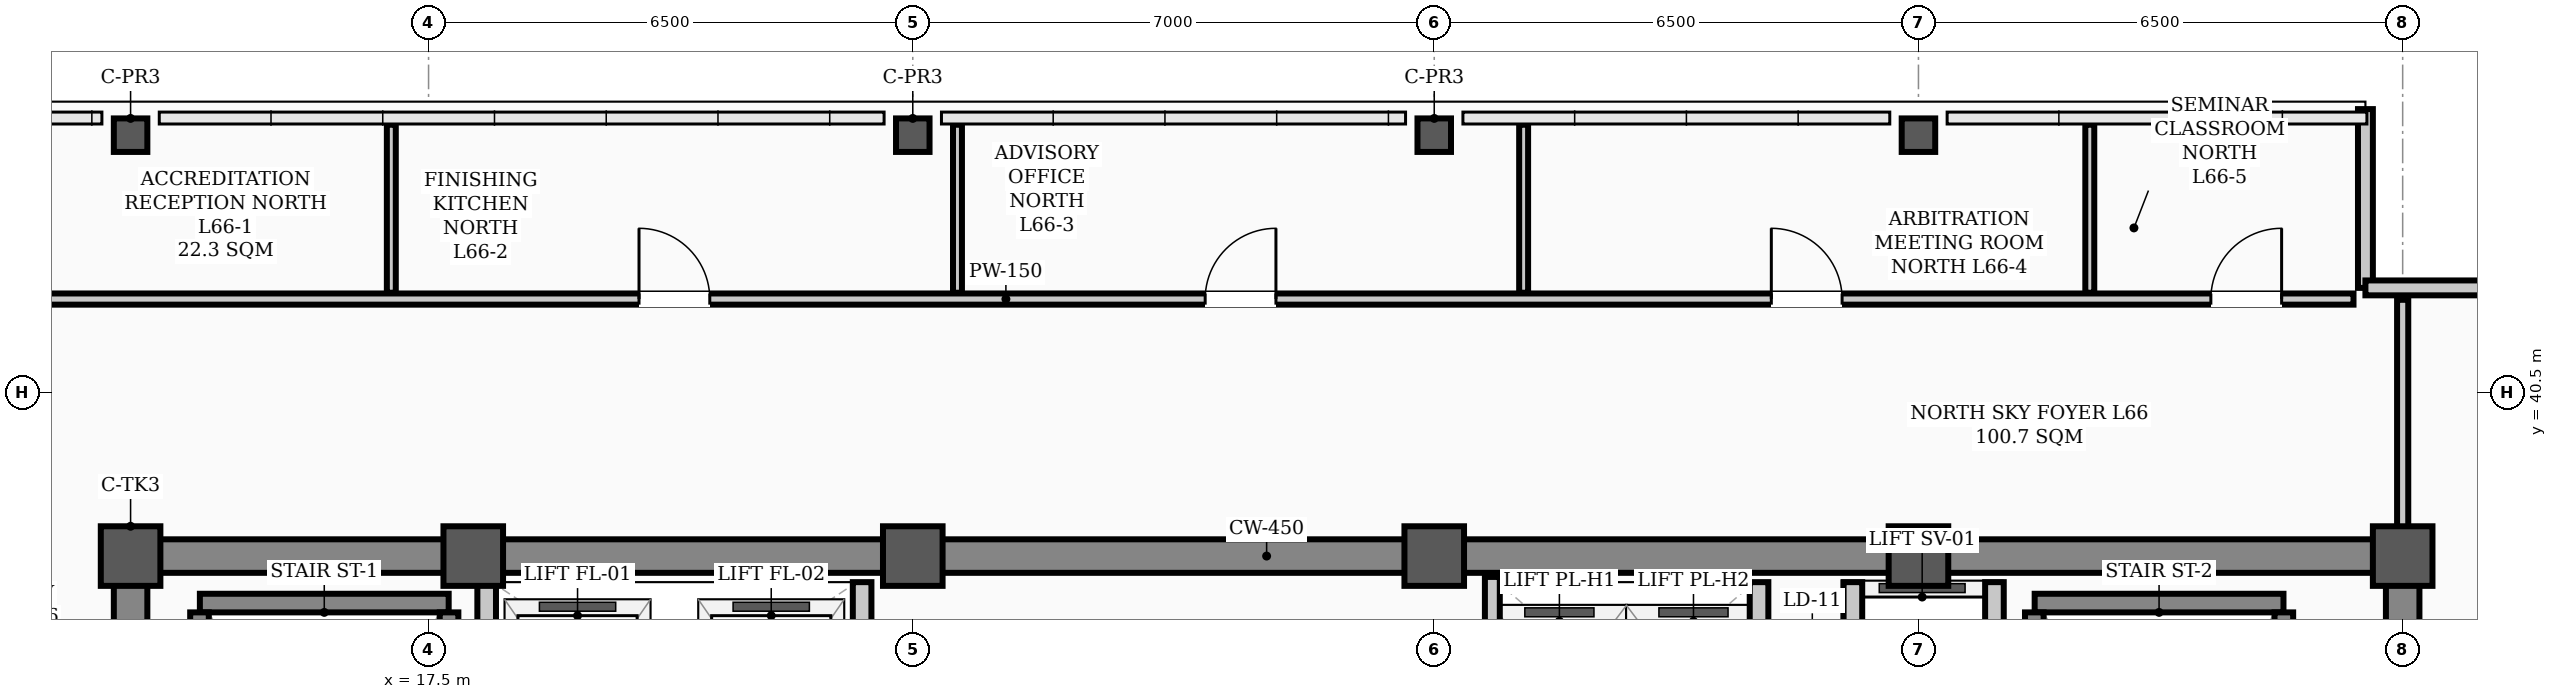
"""IFC4 building model, lengths in metres.
Left out: names, types, materials, properties, quantities, classifications, styles, units other than length and angle.
Written with IfcOpenShell. Run it as: python <this file> out.ifc"""

import sys

from ifc_helpers import new_model, si_unit, direction, frame, frame_2d, origin, origin_2d, place, context, subcontext, project, spatial, rectangle, hollow_rectangle, extrude, element, fill, save


model = new_model("IFC4")
c1 = context("Model", 3, precision=1e-05, world=origin(), true_north=direction((0.0, 1.0)))
c2 = subcontext(c1, "Body", "Model", "MODEL_VIEW")
j1 = project(units=[si_unit("LENGTHUNIT", "METRE"), si_unit("PLANEANGLEUNIT", "RADIAN")], contexts=[c1])
p1 = place(None, origin())
s1 = spatial("IfcSite", under=j1, at=p1, CompositionType="ELEMENT")
p2 = place(p1, origin())
s2 = spatial("IfcBuilding", under=s1, at=p2, CompositionType="ELEMENT")
p3 = place(p2, frame((0.0, 0.0, 265.7)))
s3 = spatial("IfcBuildingStorey", under=s2, at=p3, CompositionType="ELEMENT", Elevation=265.7)
for number, where, z_axis, x_axis in (
    (1, (13.5, 38.3, 0.0), (0.0, 0.0, 1.0), (1.0, 0.0, 0.0)),
    (2, (18.1, 38.3, 0.0), (0.0, 0.0, 1.0), (1.0, 0.0, 0.0)),
    (3, (24.0, 38.3, 0.0), (0.0, 0.0, 1.0), (1.0, 0.0, 0.0)),
    (4, (31.0, 38.3, 0.0), (0.0, 0.0, 1.0), (1.0, 0.0, 0.0)),
    (5, (37.5, 38.3, 0.0), (0.0, 0.0, 1.0), (1.0, 0.0, 0.0)),
    (6, (44.0, 38.3, 0.0), (0.0, 0.0, 1.0), (1.0, 0.0, 0.0)),
):
    element("IfcColumn", number, at=place(p3, frame(where, z_axis=z_axis, x_axis=x_axis)), inside=s3, PredefinedType="COLUMN", context=c2, shape_type="SweptSolid", body=[
        extrude(hollow_rectangle(XDim=0.8, YDim=0.8, WallThickness=0.032, InnerFilletRadius=0.016, OuterFilletRadius=0.048, at=origin_2d()), origin(), (0.0, 0.0, 1.0), 3.9),
    ])
for number, where, z_axis, x_axis in (
    (7, (13.5, 43.95, 0.0), (0.0, 0.0, 1.0), (1.0, 0.0, 0.0)),
    (8, (24.0, 43.95, 0.0), (0.0, 0.0, 1.0), (1.0, 0.0, 0.0)),
    (9, (31.0, 43.95, 0.0), (0.0, 0.0, 1.0), (1.0, 0.0, 0.0)),
    (10, (37.5, 43.95, 0.0), (0.0, 0.0, 1.0), (1.0, 0.0, 0.0)),
):
    element("IfcColumn", number, at=place(p3, frame(where, z_axis=z_axis, x_axis=x_axis)), inside=s3, PredefinedType="COLUMN", context=c2, shape_type="SweptSolid", body=[
        extrude(hollow_rectangle(XDim=0.45, YDim=0.45, WallThickness=0.022, InnerFilletRadius=0.022, OuterFilletRadius=0.044, at=origin_2d()), origin(), (0.0, 0.0, 1.0), 3.9),
    ])
p4 = place(p3, frame((43.5, 44.3, 0.0), z_axis=(0.0, 0.0, 1.0), x_axis=(0.0, -1.0, 0.0)))
e11 = element("IfcWall", 11, at=p4, inside=s3, PredefinedType="PARAPET", context=c2, shape_type="SweptSolid", body=[
    extrude(rectangle(XDim=2.4, YDim=0.2, at=frame_2d((1.2, 0.0))), origin(), (0.0, 0.0, 1.0), 1.2),
])
p5 = place(p3, frame((43.5, 41.9, 0.0), z_axis=(0.0, 0.0, 1.0), x_axis=(1.0, 0.0, 0.0)))
e12 = element("IfcWall", 12, at=p5, inside=s3, PredefinedType="PARAPET", context=c2, shape_type="SweptSolid", body=[
    extrude(rectangle(XDim=2.4, YDim=0.2, at=frame_2d((1.2, 0.0))), origin(), (0.0, 0.0, 1.0), 1.2),
])
p6 = place(p3, frame((13.5, 38.3, 0.0), z_axis=(0.0, 0.0, 1.0), x_axis=(1.0, 0.0, 0.0)))
e13 = element("IfcWall", 13, at=p6, inside=s3, PredefinedType="SHEAR", context=c2, shape_type="SweptSolid", body=[
    extrude(rectangle(XDim=30.5, YDim=0.45, at=frame_2d((15.25, 0.0))), origin(), (0.0, 0.0, 1.0), 3.72),
])
for number, where, z_axis, x_axis in (
    (14, (13.5, 29.35, 0.0), (0.0, 0.0, 1.0), (0.0, 1.0, 0.0)),
    (15, (44.0, 29.35, 0.0), (0.0, 0.0, 1.0), (0.0, 1.0, 0.0)),
):
    element("IfcWall", number, at=place(p3, frame(where, z_axis=z_axis, x_axis=x_axis)), inside=s3, PredefinedType="SHEAR", context=c2, shape_type="SweptSolid", body=[
        extrude(rectangle(XDim=8.6, YDim=0.45, at=frame_2d((4.3, 0.0))), origin(), (0.0, 0.0, 1.0), 3.72),
    ])
p7 = place(p3, frame((14.43, 37.669, 0.0), z_axis=(0.0, 0.0, 1.0), x_axis=(1.0, 0.0, 0.0)))
e16 = element("IfcWall", 16, at=p7, inside=s3, PredefinedType="STANDARD", context=c2, shape_type="SweptSolid", body=[
    extrude(rectangle(XDim=3.34, YDim=0.25, at=frame_2d((1.67, 0.0))), origin(), (0.0, 0.0, 1.0), 3.72),
])
for number, where, z_axis, x_axis in (
    (17, (14.425, 30.36, 0.0), (0.0, 0.0, 1.0), (0.0, 1.0, 0.0)),
    (18, (17.775, 30.36, 0.0), (0.0, 0.0, 1.0), (0.0, 1.0, 0.0)),
):
    element("IfcWall", number, at=place(p3, frame(where, z_axis=z_axis, x_axis=x_axis)), inside=s3, PredefinedType="STANDARD", context=c2, shape_type="SweptSolid", body=[
        extrude(rectangle(XDim=7.184, YDim=0.25, at=frame_2d((3.592, 0.0))), origin(), (0.0, 0.0, 1.0), 3.72),
    ])
p8 = place(p3, frame((39.06, 37.669, 0.0), z_axis=(0.0, 0.0, 1.0), x_axis=(1.0, 0.0, 0.0)))
e19 = element("IfcWall", 19, at=p8, inside=s3, PredefinedType="STANDARD", context=c2, shape_type="SweptSolid", body=[
    extrude(rectangle(XDim=3.34, YDim=0.25, at=frame_2d((1.67, 0.0))), origin(), (0.0, 0.0, 1.0), 3.72),
])
for number, where, z_axis, x_axis in (
    (20, (39.055, 30.36, 0.0), (0.0, 0.0, 1.0), (0.0, 1.0, 0.0)),
    (21, (42.405, 30.36, 0.0), (0.0, 0.0, 1.0), (0.0, 1.0, 0.0)),
):
    element("IfcWall", number, at=place(p3, frame(where, z_axis=z_axis, x_axis=x_axis)), inside=s3, PredefinedType="STANDARD", context=c2, shape_type="SweptSolid", body=[
        extrude(rectangle(XDim=7.184, YDim=0.25, at=frame_2d((3.592, 0.0))), origin(), (0.0, 0.0, 1.0), 3.72),
    ])
p9 = place(p3, frame((36.62, 31.95, 0.0), z_axis=(0.0, 0.0, 1.0), x_axis=(0.0, 1.0, 0.0)))
e22 = element("IfcWall", 22, at=p9, inside=s3, PredefinedType="STANDARD", context=c2, shape_type="SweptSolid", body=[
    extrude(rectangle(XDim=6.0, YDim=0.25, at=frame_2d((3.0, 0.0))), origin(), (0.0, 0.0, 1.0), 3.4),
])
p10 = place(p9, frame((0.9, 0.0, 0.0)))
e23 = element("IfcOpeningElement", 23, at=p10, cuts=e22, PredefinedType="OPENING", context=c2, shape_type="SweptSolid", body=[
    extrude(rectangle(XDim=1.1, YDim=2.08, at=frame_2d((0.55, 1.04))), frame((0.0, 0.135, 0.0), z_axis=(0.0, -1.0, 0.0), x_axis=(1.0, 0.0, 0.0)), (0.0, 0.0, 1.0), 0.27),
])
p11 = place(p9, frame((4.0, 0.0, 0.0)))
e24 = element("IfcOpeningElement", 24, at=p11, cuts=e22, PredefinedType="OPENING", context=c2, shape_type="SweptSolid", body=[
    extrude(rectangle(XDim=1.1, YDim=2.08, at=frame_2d((0.55, 1.04))), frame((0.0, 0.135, 0.0), z_axis=(0.0, -1.0, 0.0), x_axis=(1.0, 0.0, 0.0)), (0.0, 0.0, 1.0), 0.27),
])
p12 = place(p3, frame((38.52, 31.95, 0.0), z_axis=(0.0, 0.0, 1.0), x_axis=(0.0, 1.0, 0.0)))
e25 = element("IfcWall", 25, at=p12, inside=s3, PredefinedType="STANDARD", context=c2, shape_type="SweptSolid", body=[
    extrude(rectangle(XDim=6.0, YDim=0.25, at=frame_2d((3.0, 0.0))), origin(), (0.0, 0.0, 1.0), 3.48),
])
for number, where, z_axis, x_axis in (
    (26, (18.28, 34.62, 0.0), (0.0, 0.0, 1.0), (0.0, 1.0, 0.0)),
    (27, (23.32, 34.62, 0.0), (0.0, 0.0, 1.0), (0.0, 1.0, 0.0)),
):
    element("IfcWall", number, at=place(p3, frame(where, z_axis=z_axis, x_axis=x_axis)), inside=s3, PredefinedType="STANDARD", context=c2, shape_type="SweptSolid", body=[
        extrude(rectangle(XDim=3.33, YDim=0.25, at=frame_2d((1.665, 0.0))), origin(), (0.0, 0.0, 1.0), 3.4),
    ])
p13 = place(p3, frame((35.36, 34.9, 0.0), z_axis=(0.0, 0.0, 1.0), x_axis=(0.0, 1.0, 0.0)))
e28 = element("IfcWall", 28, at=p13, inside=s3, PredefinedType="STANDARD", context=c2, shape_type="SweptSolid", body=[
    extrude(rectangle(XDim=3.05, YDim=0.25, at=frame_2d((1.525, 0.0))), origin(), (0.0, 0.0, 1.0), 3.4),
])
p14 = place(p3, frame((7.16, 41.75, 0.0), z_axis=(0.0, 0.0, 1.0), x_axis=(1.0, 0.0, 0.0)))
e29 = element("IfcWall", 29, at=p14, inside=s3, PredefinedType="PARTITIONING", context=c2, shape_type="SweptSolid", body=[
    extrude(rectangle(XDim=36.18, YDim=0.15, at=frame_2d((18.09, 0.0))), origin(), (0.0, 0.0, 1.0), 3.2),
])
p15 = place(p14, frame((3.855, 0.0, 0.0)))
e30 = element("IfcOpeningElement", 30, at=p15, cuts=e29, PredefinedType="OPENING", context=c2, shape_type="SweptSolid", body=[
    extrude(rectangle(XDim=0.95, YDim=2.08, at=frame_2d((0.475, 1.04))), frame((0.0, 0.085, 0.0), z_axis=(0.0, -1.0, 0.0), x_axis=(1.0, 0.0, 0.0)), (0.0, 0.0, 1.0), 0.17),
])
p16 = place(p14, frame((13.165, 0.0, 0.0)))
e31 = element("IfcOpeningElement", 31, at=p16, cuts=e29, PredefinedType="OPENING", context=c2, shape_type="SweptSolid", body=[
    extrude(rectangle(XDim=0.95, YDim=2.08, at=frame_2d((0.475, 1.04))), frame((0.0, 0.085, 0.0), z_axis=(0.0, -1.0, 0.0), x_axis=(1.0, 0.0, 0.0)), (0.0, 0.0, 1.0), 0.17),
])
p17 = place(p14, frame((20.765, 0.0, 0.0)))
e32 = element("IfcOpeningElement", 32, at=p17, cuts=e29, PredefinedType="OPENING", context=c2, shape_type="SweptSolid", body=[
    extrude(rectangle(XDim=0.95, YDim=2.08, at=frame_2d((0.475, 1.04))), frame((0.0, 0.085, 0.0), z_axis=(0.0, -1.0, 0.0), x_axis=(1.0, 0.0, 0.0)), (0.0, 0.0, 1.0), 0.17),
])
p18 = place(p14, frame((28.365, 0.0, 0.0)))
e33 = element("IfcOpeningElement", 33, at=p18, cuts=e29, PredefinedType="OPENING", context=c2, shape_type="SweptSolid", body=[
    extrude(rectangle(XDim=0.95, YDim=2.08, at=frame_2d((0.475, 1.04))), frame((0.0, 0.085, 0.0), z_axis=(0.0, -1.0, 0.0), x_axis=(1.0, 0.0, 0.0)), (0.0, 0.0, 1.0), 0.17),
])
p19 = place(p14, frame((34.265, 0.0, 0.0)))
e34 = element("IfcOpeningElement", 34, at=p19, cuts=e29, PredefinedType="OPENING", context=c2, shape_type="SweptSolid", body=[
    extrude(rectangle(XDim=0.95, YDim=2.08, at=frame_2d((0.475, 1.04))), frame((0.0, 0.085, 0.0), z_axis=(0.0, -1.0, 0.0), x_axis=(1.0, 0.0, 0.0)), (0.0, 0.0, 1.0), 0.17),
])
p20 = place(p3, frame((44.0, 38.535, 0.0), z_axis=(0.0, 0.0, 1.0), x_axis=(0.0, 1.0, 0.0)))
e35 = element("IfcWall", 35, at=p20, inside=s3, PredefinedType="PARTITIONING", context=c2, shape_type="SweptSolid", body=[
    extrude(rectangle(XDim=3.205, YDim=0.15, at=frame_2d((1.603, 0.0))), origin(), (0.0, 0.0, 1.0), 3.72),
])
p21 = place(p3, frame((17.0, 41.835, 0.0), z_axis=(0.0, 0.0, 1.0), x_axis=(0.0, 1.0, 0.0)))
e36 = element("IfcWall", 36, at=p21, inside=s3, PredefinedType="PARTITIONING", context=c2, shape_type="SweptSolid", body=[
    extrude(rectangle(XDim=2.255, YDim=0.12, at=frame_2d((1.127, 0.0))), origin(), (0.0, 0.0, 1.0), 3.212),
])
p22 = place(p3, frame((24.6, 41.835, 0.0), z_axis=(0.0, 0.0, 1.0), x_axis=(0.0, 1.0, 0.0)))
e37 = element("IfcWall", 37, at=p22, inside=s3, PredefinedType="PARTITIONING", context=c2, shape_type="SweptSolid", body=[
    extrude(rectangle(XDim=2.255, YDim=0.12, at=frame_2d((1.127, 0.0))), origin(), (0.0, 0.0, 1.0), 3.2),
])
p23 = place(p3, frame((32.2, 41.835, 0.0), z_axis=(0.0, 0.0, 1.0), x_axis=(0.0, 1.0, 0.0)))
e38 = element("IfcWall", 38, at=p23, inside=s3, PredefinedType="PARTITIONING", context=c2, shape_type="SweptSolid", body=[
    extrude(rectangle(XDim=2.255, YDim=0.12, at=frame_2d((1.127, 0.0))), origin(), (0.0, 0.0, 1.0), 3.212),
])
p24 = place(p3, frame((39.8, 41.835, 0.0), z_axis=(0.0, 0.0, 1.0), x_axis=(0.0, 1.0, 0.0)))
e39 = element("IfcWall", 39, at=p24, inside=s3, PredefinedType="PARTITIONING", context=c2, shape_type="SweptSolid", body=[
    extrude(rectangle(XDim=2.255, YDim=0.12, at=frame_2d((1.127, 0.0))), origin(), (0.0, 0.0, 1.0), 3.72),
])
p25 = place(p3, frame((31.78, 34.9, 0.0), z_axis=(0.0, 0.0, 1.0), x_axis=(0.0, 1.0, 0.0)))
e40 = element("IfcWall", 40, at=p25, inside=s3, PredefinedType="STANDARD", context=c2, shape_type="SweptSolid", body=[
    extrude(rectangle(XDim=3.12, YDim=0.2, at=frame_2d((1.56, 0.0))), origin(), (0.0, 0.0, 1.0), 3.4),
])
p26 = place(p16, origin())
e41 = element("IfcDoor", 41, at=p26, inside=s3, OperationType="SINGLE_SWING_LEFT", PredefinedType="DOOR", context=c2, shape_type="SweptSolid", body=[
    extrude(rectangle(XDim=0.95, YDim=2.08, at=frame_2d((0.475, 1.04))), frame((0.0, 0.025, 0.0), z_axis=(0.0, -1.0, 0.0), x_axis=(1.0, 0.0, 0.0)), (0.0, 0.0, 1.0), 0.05),
])
fill(e31, e41)
p27 = place(p17, origin())
e42 = element("IfcDoor", 42, at=p27, inside=s3, OperationType="SINGLE_SWING_RIGHT", PredefinedType="DOOR", context=c2, shape_type="SweptSolid", body=[
    extrude(rectangle(XDim=0.95, YDim=2.08, at=frame_2d((0.475, 1.04))), frame((0.0, 0.025, 0.0), z_axis=(0.0, -1.0, 0.0), x_axis=(1.0, 0.0, 0.0)), (0.0, 0.0, 1.0), 0.05),
])
fill(e32, e42)
p28 = place(p18, origin())
e43 = element("IfcDoor", 43, at=p28, inside=s3, OperationType="SINGLE_SWING_LEFT", PredefinedType="DOOR", context=c2, shape_type="SweptSolid", body=[
    extrude(rectangle(XDim=0.95, YDim=2.08, at=frame_2d((0.475, 1.04))), frame((0.0, 0.025, 0.0), z_axis=(0.0, -1.0, 0.0), x_axis=(1.0, 0.0, 0.0)), (0.0, 0.0, 1.0), 0.05),
])
fill(e33, e43)
p29 = place(p19, origin())
e44 = element("IfcDoor", 44, at=p29, inside=s3, OperationType="SINGLE_SWING_RIGHT", PredefinedType="DOOR", context=c2, shape_type="SweptSolid", body=[
    extrude(rectangle(XDim=0.95, YDim=2.08, at=frame_2d((0.475, 1.04))), frame((0.0, 0.025, 0.0), z_axis=(0.0, -1.0, 0.0), x_axis=(1.0, 0.0, 0.0)), (0.0, 0.0, 1.0), 0.05),
])
fill(e34, e44)
save(model, sys.argv[1])
